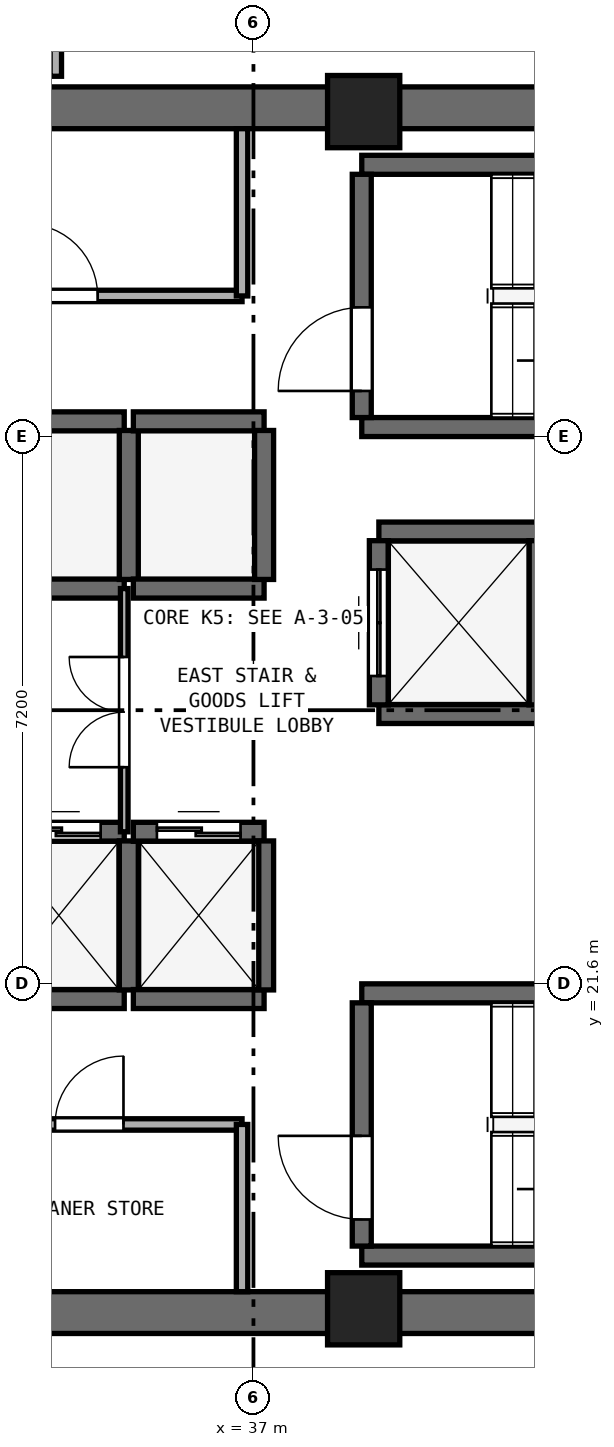
"""IFC4 building model, lengths in metres.
Left out: names, types, materials, properties, quantities, classifications, styles, units other than length and angle.
Written with IfcOpenShell. Run it as: python <this file> out.ifc"""

import sys

from ifc_helpers import new_model, si_unit, direction, frame, frame_2d, origin, origin_2d, place, context, subcontext, project, spatial, rectangle, extrude, element, fill, save


model = new_model("IFC4")
c1 = context("Model", 3, precision=1e-05, world=origin(), true_north=direction((0.0, 1.0)))
c2 = subcontext(c1, "Body", "Model", "MODEL_VIEW")
j1 = project(units=[si_unit("LENGTHUNIT", "METRE"), si_unit("PLANEANGLEUNIT", "RADIAN")], contexts=[c1])
p1 = place(None, origin())
s1 = spatial("IfcSite", under=j1, at=p1, CompositionType="ELEMENT")
p2 = place(p1, origin())
s2 = spatial("IfcBuilding", under=s1, at=p2, CompositionType="ELEMENT")
p3 = place(p2, frame((0.0, 0.0, 144.0)))
s3 = spatial("IfcBuildingStorey", under=s2, at=p3, CompositionType="ELEMENT", Elevation=144.0)
for number, where, z_axis, x_axis in (
    (1, (25.4, 17.275, 0.0), (0.0, 0.0, 1.0), (1.0, 0.0, 0.0)),
    (2, (25.4, 33.125, 0.0), (0.0, 0.0, 1.0), (1.0, 0.0, 0.0)),
):
    element("IfcWall", number, at=place(p3, frame(where, z_axis=z_axis, x_axis=x_axis)), inside=s3, PredefinedType="SHEAR", context=c2, shape_type="SweptSolid", body=[
        extrude(rectangle(XDim=23.2, YDim=0.55, at=frame_2d((11.6, 0.0))), origin(), (0.0, 0.0, 1.0), 3.54),
    ])
for number, where, z_axis, x_axis in (
    (3, (38.45, 17.325, 0.0), (0.0, 0.0, 1.0), (1.0, 0.0, 0.0)),
    (4, (38.45, 33.075, 0.0), (0.0, 0.0, 1.0), (1.0, 0.0, 0.0)),
):
    element("IfcColumn", number, at=place(p3, frame(where, z_axis=z_axis, x_axis=x_axis)), inside=s3, PredefinedType="PILASTER", context=c2, shape_type="SweptSolid", body=[
        extrude(rectangle(XDim=0.95, YDim=0.95, at=origin_2d()), origin(), (0.0, 0.0, 1.0), 3.8),
    ])
for number, where, z_axis, x_axis in (
    (5, (38.425, 28.925, 0.0), (0.0, 0.0, 1.0), (1.0, 0.0, 0.0)),
    (6, (38.425, 32.375, 0.0), (0.0, 0.0, 1.0), (1.0, 0.0, 0.0)),
):
    element("IfcWall", number, at=place(p3, frame(where, z_axis=z_axis, x_axis=x_axis)), inside=s3, PredefinedType="SHEAR", context=c2, shape_type="SweptSolid", body=[
        extrude(rectangle(XDim=7.3, YDim=0.25, at=frame_2d((3.65, 0.0))), origin(), (0.0, 0.0, 1.0), 3.54),
    ])
p4 = place(p3, frame((38.425, 29.05, 0.0), z_axis=(0.0, 0.0, 1.0), x_axis=(0.0, 1.0, 0.0)))
e7 = element("IfcWall", 7, at=p4, inside=s3, PredefinedType="SHEAR", context=c2, shape_type="SweptSolid", body=[
    extrude(rectangle(XDim=3.2, YDim=0.25, at=frame_2d((1.6, 0.0))), origin(), (0.0, 0.0, 1.0), 3.54),
])
p5 = place(p4, frame((0.35, 0.0, 0.0)))
e8 = element("IfcOpeningElement", 8, at=p5, cuts=e7, PredefinedType="OPENING", context=c2, shape_type="SweptSolid", body=[
    extrude(rectangle(XDim=1.1, YDim=2.15, at=frame_2d((0.55, 1.075))), frame((0.0, 0.135, 0.0), z_axis=(0.0, -1.0, 0.0), x_axis=(1.0, 0.0, 0.0)), (0.0, 0.0, 1.0), 0.27),
])
for number, where, z_axis, x_axis in (
    (9, (38.425, 18.025, 0.0), (0.0, 0.0, 1.0), (1.0, 0.0, 0.0)),
    (10, (38.425, 21.475, 0.0), (0.0, 0.0, 1.0), (1.0, 0.0, 0.0)),
):
    element("IfcWall", number, at=place(p3, frame(where, z_axis=z_axis, x_axis=x_axis)), inside=s3, PredefinedType="SHEAR", context=c2, shape_type="SweptSolid", body=[
        extrude(rectangle(XDim=7.3, YDim=0.25, at=frame_2d((3.65, 0.0))), origin(), (0.0, 0.0, 1.0), 3.54),
    ])
p6 = place(p3, frame((38.425, 18.15, 0.0), z_axis=(0.0, 0.0, 1.0), x_axis=(0.0, 1.0, 0.0)))
e11 = element("IfcWall", 11, at=p6, inside=s3, PredefinedType="SHEAR", context=c2, shape_type="SweptSolid", body=[
    extrude(rectangle(XDim=3.2, YDim=0.25, at=frame_2d((1.6, 0.0))), origin(), (0.0, 0.0, 1.0), 3.54),
])
p7 = place(p6, frame((0.35, 0.0, 0.0)))
e12 = element("IfcOpeningElement", 12, at=p7, cuts=e11, PredefinedType="OPENING", context=c2, shape_type="SweptSolid", body=[
    extrude(rectangle(XDim=1.1, YDim=2.15, at=frame_2d((0.55, 1.075))), frame((0.0, 0.135, 0.0), z_axis=(0.0, -1.0, 0.0), x_axis=(1.0, 0.0, 0.0)), (0.0, 0.0, 1.0), 0.27),
])
p8 = place(p3, frame((33.58, 21.4, 0.0), z_axis=(0.0, 0.0, 1.0), x_axis=(1.0, 0.0, 0.0)))
e13 = element("IfcWall", 13, at=p8, inside=s3, PredefinedType="SHEAR", context=c2, shape_type="SweptSolid", body=[
    extrude(rectangle(XDim=1.72, YDim=0.25, at=frame_2d((0.86, 0.0))), origin(), (0.0, 0.0, 1.0), 3.54),
])
p9 = place(p3, frame((33.58, 23.6, 0.0), z_axis=(0.0, 0.0, 1.0), x_axis=(1.0, 0.0, 0.0)))
e14 = element("IfcWall", 14, at=p9, inside=s3, PredefinedType="SHEAR", context=c2, shape_type="SweptSolid", body=[
    extrude(rectangle(XDim=1.72, YDim=0.25, at=frame_2d((0.86, 0.0))), origin(), (0.0, 0.0, 1.0), 3.54),
])
p10 = place(p9, frame((0.31, 0.0, 0.0)))
e15 = element("IfcOpeningElement", 15, at=p10, cuts=e14, PredefinedType="OPENING", context=c2, shape_type="SweptSolid", body=[
    extrude(rectangle(XDim=1.1, YDim=2.15, at=frame_2d((0.55, 1.075))), frame((0.0, 0.135, 0.0), z_axis=(0.0, -1.0, 0.0), x_axis=(1.0, 0.0, 0.0)), (0.0, 0.0, 1.0), 0.27),
])
p11 = place(p3, frame((35.36, 21.52, 0.0), z_axis=(0.0, 0.0, 1.0), x_axis=(0.0, 1.0, 0.0)))
e16 = element("IfcWall", 16, at=p11, inside=s3, PredefinedType="SHEAR", context=c2, shape_type="SweptSolid", body=[
    extrude(rectangle(XDim=1.96, YDim=0.25, at=frame_2d((0.98, 0.0))), origin(), (0.0, 0.0, 1.0), 3.54),
])
p12 = place(p3, frame((35.42, 21.4, 0.0), z_axis=(0.0, 0.0, 1.0), x_axis=(1.0, 0.0, 0.0)))
e17 = element("IfcWall", 17, at=p12, inside=s3, PredefinedType="SHEAR", context=c2, shape_type="SweptSolid", body=[
    extrude(rectangle(XDim=1.72, YDim=0.25, at=frame_2d((0.86, 0.0))), origin(), (0.0, 0.0, 1.0), 3.54),
])
p13 = place(p3, frame((35.42, 23.6, 0.0), z_axis=(0.0, 0.0, 1.0), x_axis=(1.0, 0.0, 0.0)))
e18 = element("IfcWall", 18, at=p13, inside=s3, PredefinedType="SHEAR", context=c2, shape_type="SweptSolid", body=[
    extrude(rectangle(XDim=1.72, YDim=0.25, at=frame_2d((0.86, 0.0))), origin(), (0.0, 0.0, 1.0), 3.54),
])
p14 = place(p13, frame((0.31, 0.0, 0.0)))
e19 = element("IfcOpeningElement", 19, at=p14, cuts=e18, PredefinedType="OPENING", context=c2, shape_type="SweptSolid", body=[
    extrude(rectangle(XDim=1.1, YDim=2.15, at=frame_2d((0.55, 1.075))), frame((0.0, 0.135, 0.0), z_axis=(0.0, -1.0, 0.0), x_axis=(1.0, 0.0, 0.0)), (0.0, 0.0, 1.0), 0.27),
])
p15 = place(p3, frame((37.14, 21.52, 0.0), z_axis=(0.0, 0.0, 1.0), x_axis=(0.0, 1.0, 0.0)))
e20 = element("IfcWall", 20, at=p15, inside=s3, PredefinedType="SHEAR", context=c2, shape_type="SweptSolid", body=[
    extrude(rectangle(XDim=1.96, YDim=0.25, at=frame_2d((0.98, 0.0))), origin(), (0.0, 0.0, 1.0), 3.54),
])
for number, where, z_axis, x_axis in (
    (21, (33.58, 26.8, 0.0), (0.0, 0.0, 1.0), (1.0, 0.0, 0.0)),
    (22, (33.58, 29.0, 0.0), (0.0, 0.0, 1.0), (1.0, 0.0, 0.0)),
):
    element("IfcWall", number, at=place(p3, frame(where, z_axis=z_axis, x_axis=x_axis)), inside=s3, PredefinedType="SHEAR", context=c2, shape_type="SweptSolid", body=[
        extrude(rectangle(XDim=1.72, YDim=0.25, at=frame_2d((0.86, 0.0))), origin(), (0.0, 0.0, 1.0), 3.54),
    ])
p16 = place(p3, frame((35.36, 26.92, 0.0), z_axis=(0.0, 0.0, 1.0), x_axis=(0.0, 1.0, 0.0)))
e23 = element("IfcWall", 23, at=p16, inside=s3, PredefinedType="SHEAR", context=c2, shape_type="SweptSolid", body=[
    extrude(rectangle(XDim=1.96, YDim=0.25, at=frame_2d((0.98, 0.0))), origin(), (0.0, 0.0, 1.0), 3.54),
])
for number, where, z_axis, x_axis in (
    (24, (35.42, 26.8, 0.0), (0.0, 0.0, 1.0), (1.0, 0.0, 0.0)),
    (25, (35.42, 29.0, 0.0), (0.0, 0.0, 1.0), (1.0, 0.0, 0.0)),
):
    element("IfcWall", number, at=place(p3, frame(where, z_axis=z_axis, x_axis=x_axis)), inside=s3, PredefinedType="SHEAR", context=c2, shape_type="SweptSolid", body=[
        extrude(rectangle(XDim=1.72, YDim=0.25, at=frame_2d((0.86, 0.0))), origin(), (0.0, 0.0, 1.0), 3.54),
    ])
p17 = place(p3, frame((37.14, 26.92, 0.0), z_axis=(0.0, 0.0, 1.0), x_axis=(0.0, 1.0, 0.0)))
e26 = element("IfcWall", 26, at=p17, inside=s3, PredefinedType="SHEAR", context=c2, shape_type="SweptSolid", body=[
    extrude(rectangle(XDim=1.96, YDim=0.25, at=frame_2d((0.98, 0.0))), origin(), (0.0, 0.0, 1.0), 3.54),
])
for number, where, z_axis, x_axis in (
    (27, (38.65, 25.15, 0.0), (0.0, 0.0, 1.0), (1.0, 0.0, 0.0)),
    (28, (38.65, 27.55, 0.0), (0.0, 0.0, 1.0), (1.0, 0.0, 0.0)),
):
    element("IfcWall", number, at=place(p3, frame(where, z_axis=z_axis, x_axis=x_axis)), inside=s3, PredefinedType="SHEAR", context=c2, shape_type="SweptSolid", body=[
        extrude(rectangle(XDim=2.1, YDim=0.25, at=frame_2d((1.05, 0.0))), origin(), (0.0, 0.0, 1.0), 3.54),
    ])
p18 = place(p3, frame((38.65, 25.27, 0.0), z_axis=(0.0, 0.0, 1.0), x_axis=(0.0, 1.0, 0.0)))
e29 = element("IfcWall", 29, at=p18, inside=s3, PredefinedType="SHEAR", context=c2, shape_type="SweptSolid", body=[
    extrude(rectangle(XDim=2.16, YDim=0.25, at=frame_2d((1.08, 0.0))), origin(), (0.0, 0.0, 1.0), 3.54),
])
p19 = place(p18, frame((0.38, 0.0, 0.0)))
e30 = element("IfcOpeningElement", 30, at=p19, cuts=e29, PredefinedType="OPENING", context=c2, shape_type="SweptSolid", body=[
    extrude(rectangle(XDim=1.4, YDim=2.2, at=frame_2d((0.7, 1.1))), frame((0.0, 0.135, 0.0), z_axis=(0.0, -1.0, 0.0), x_axis=(1.0, 0.0, 0.0)), (0.0, 0.0, 1.0), 0.27),
])
p20 = place(p3, frame((40.75, 25.27, 0.0), z_axis=(0.0, 0.0, 1.0), x_axis=(0.0, 1.0, 0.0)))
e31 = element("IfcWall", 31, at=p20, inside=s3, PredefinedType="SHEAR", context=c2, shape_type="SweptSolid", body=[
    extrude(rectangle(XDim=2.16, YDim=0.25, at=frame_2d((1.08, 0.0))), origin(), (0.0, 0.0, 1.0), 3.54),
])
p21 = place(p3, frame((32.1, 30.65, 0.0), z_axis=(0.0, 0.0, 1.0), x_axis=(1.0, 0.0, 0.0)))
e32 = element("IfcWall", 32, at=p21, inside=s3, PredefinedType="PARTITIONING", context=c2, shape_type="SweptSolid", body=[
    extrude(rectangle(XDim=4.75, YDim=0.15, at=frame_2d((2.375, 0.0))), origin(), (0.0, 0.0, 1.0), 3.54),
])
p22 = place(p21, frame((1.9, 0.0, 0.0)))
e33 = element("IfcOpeningElement", 33, at=p22, cuts=e32, PredefinedType="OPENING", context=c2, shape_type="SweptSolid", body=[
    extrude(rectangle(XDim=0.95, YDim=2.1, at=frame_2d((0.475, 1.05))), frame((0.0, 0.085, 0.0), z_axis=(0.0, -1.0, 0.0), x_axis=(1.0, 0.0, 0.0)), (0.0, 0.0, 1.0), 0.17),
])
p23 = place(p3, frame((36.85, 30.65, 0.0), z_axis=(0.0, 0.0, 1.0), x_axis=(0.0, 1.0, 0.0)))
e34 = element("IfcWall", 34, at=p23, inside=s3, PredefinedType="PARTITIONING", context=c2, shape_type="SweptSolid", body=[
    extrude(rectangle(XDim=2.2, YDim=0.15, at=frame_2d((1.1, 0.0))), origin(), (0.0, 0.0, 1.0), 3.54),
])
p24 = place(p3, frame((32.83, 19.75, 0.0), z_axis=(0.0, 0.0, 1.0), x_axis=(1.0, 0.0, 0.0)))
e35 = element("IfcWall", 35, at=p24, inside=s3, PredefinedType="PARTITIONING", context=c2, shape_type="SweptSolid", body=[
    extrude(rectangle(XDim=4.02, YDim=0.15, at=frame_2d((2.01, 0.0))), origin(), (0.0, 0.0, 1.0), 3.54),
])
p25 = place(p24, frame((1.56, 0.0, 0.0)))
e36 = element("IfcOpeningElement", 36, at=p25, cuts=e35, PredefinedType="OPENING", context=c2, shape_type="SweptSolid", body=[
    extrude(rectangle(XDim=0.9, YDim=2.1, at=frame_2d((0.45, 1.05))), frame((0.0, 0.085, 0.0), z_axis=(0.0, -1.0, 0.0), x_axis=(1.0, 0.0, 0.0)), (0.0, 0.0, 1.0), 0.17),
])
p26 = place(p3, frame((36.85, 17.55, 0.0), z_axis=(0.0, 0.0, 1.0), x_axis=(0.0, 1.0, 0.0)))
e37 = element("IfcWall", 37, at=p26, inside=s3, PredefinedType="PARTITIONING", context=c2, shape_type="SweptSolid", body=[
    extrude(rectangle(XDim=2.2, YDim=0.15, at=frame_2d((1.1, 0.0))), origin(), (0.0, 0.0, 1.0), 3.54),
])
p27 = place(p3, frame((35.3, 23.6, 0.0), z_axis=(0.0, 0.0, 1.0), x_axis=(0.0, 1.0, 0.0)))
e38 = element("IfcWall", 38, at=p27, inside=s3, PredefinedType="PARTITIONING", context=c2, shape_type="SweptSolid", body=[
    extrude(rectangle(XDim=3.2, YDim=0.1, at=frame_2d((1.6, 0.0))), origin(), (0.0, 0.0, 1.0), 3.54),
])
p28 = place(p27, frame((0.85, 0.0, 0.0)))
e39 = element("IfcOpeningElement", 39, at=p28, cuts=e38, PredefinedType="OPENING", context=c2, shape_type="SweptSolid", body=[
    extrude(rectangle(XDim=1.45, YDim=2.12, at=frame_2d((0.725, 1.06))), frame((0.0, 0.06, 0.0), z_axis=(0.0, -1.0, 0.0), x_axis=(1.0, 0.0, 0.0)), (0.0, 0.0, 1.0), 0.12),
])
p29 = place(p3, frame((34.4, 33.54, 0.0), z_axis=(0.0, 0.0, 1.0), x_axis=(0.0, 1.0, 0.0)))
e40 = element("IfcWall", 40, at=p29, inside=s3, PredefinedType="PARTITIONING", context=c2, shape_type="SweptSolid", body=[
    extrude(rectangle(XDim=2.76, YDim=0.15, at=frame_2d((1.38, 0.0))), origin(), (0.0, 0.0, 1.0), 3.54),
])
p30 = place(p5, origin())
e41 = element("IfcDoor", 41, at=p30, inside=s3, OperationType="SINGLE_SWING_LEFT", PredefinedType="DOOR", context=c2, shape_type="SweptSolid", body=[
    extrude(rectangle(XDim=1.1, YDim=2.15, at=frame_2d((0.55, 1.075))), frame((0.0, 0.025, 0.0), z_axis=(0.0, -1.0, 0.0), x_axis=(1.0, 0.0, 0.0)), (0.0, 0.0, 1.0), 0.05),
])
fill(e8, e41)
p31 = place(p7, origin())
e42 = element("IfcDoor", 42, at=p31, inside=s3, OperationType="SINGLE_SWING_RIGHT", PredefinedType="DOOR", context=c2, shape_type="SweptSolid", body=[
    extrude(rectangle(XDim=1.1, YDim=2.15, at=frame_2d((0.55, 1.075))), frame((0.0, 0.025, 0.0), z_axis=(0.0, -1.0, 0.0), x_axis=(1.0, 0.0, 0.0)), (0.0, 0.0, 1.0), 0.05),
])
fill(e12, e42)
p32 = place(p10, origin())
e43 = element("IfcDoor", 43, at=p32, inside=s3, OperationType="DOUBLE_DOOR_SLIDING", PredefinedType="DOOR", context=c2, shape_type="SweptSolid", body=[
    extrude(rectangle(XDim=1.1, YDim=2.15, at=frame_2d((0.55, 1.075))), frame((0.0, 0.025, 0.0), z_axis=(0.0, -1.0, 0.0), x_axis=(1.0, 0.0, 0.0)), (0.0, 0.0, 1.0), 0.05),
])
fill(e15, e43)
p33 = place(p14, origin())
e44 = element("IfcDoor", 44, at=p33, inside=s3, OperationType="DOUBLE_DOOR_SLIDING", PredefinedType="DOOR", context=c2, shape_type="SweptSolid", body=[
    extrude(rectangle(XDim=1.1, YDim=2.15, at=frame_2d((0.55, 1.075))), frame((0.0, 0.025, 0.0), z_axis=(0.0, -1.0, 0.0), x_axis=(1.0, 0.0, 0.0)), (0.0, 0.0, 1.0), 0.05),
])
fill(e19, e44)
p34 = place(p19, origin())
e45 = element("IfcDoor", 45, at=p34, inside=s3, OperationType="DOUBLE_DOOR_SLIDING", PredefinedType="DOOR", context=c2, shape_type="SweptSolid", body=[
    extrude(rectangle(XDim=1.4, YDim=2.2, at=frame_2d((0.7, 1.1))), frame((0.0, 0.025, 0.0), z_axis=(0.0, -1.0, 0.0), x_axis=(1.0, 0.0, 0.0)), (0.0, 0.0, 1.0), 0.05),
])
fill(e30, e45)
p35 = place(p22, origin())
e46 = element("IfcDoor", 46, at=p35, inside=s3, OperationType="SINGLE_SWING_LEFT", PredefinedType="DOOR", context=c2, shape_type="SweptSolid", body=[
    extrude(rectangle(XDim=0.95, YDim=2.1, at=frame_2d((0.475, 1.05))), frame((0.0, 0.025, 0.0), z_axis=(0.0, -1.0, 0.0), x_axis=(1.0, 0.0, 0.0)), (0.0, 0.0, 1.0), 0.05),
])
fill(e33, e46)
p36 = place(p25, origin())
e47 = element("IfcDoor", 47, at=p36, inside=s3, OperationType="SINGLE_SWING_RIGHT", PredefinedType="DOOR", context=c2, shape_type="SweptSolid", body=[
    extrude(rectangle(XDim=0.9, YDim=2.1, at=frame_2d((0.45, 1.05))), frame((0.0, 0.025, 0.0), z_axis=(0.0, -1.0, 0.0), x_axis=(1.0, 0.0, 0.0)), (0.0, 0.0, 1.0), 0.05),
])
fill(e36, e47)
p37 = place(p28, origin())
e48 = element("IfcDoor", 48, at=p37, inside=s3, OperationType="DOUBLE_DOOR_SINGLE_SWING", PredefinedType="DOOR", context=c2, shape_type="SweptSolid", body=[
    extrude(rectangle(XDim=1.45, YDim=2.12, at=frame_2d((0.725, 1.06))), frame((0.0, 0.025, 0.0), z_axis=(0.0, -1.0, 0.0), x_axis=(1.0, 0.0, 0.0)), (0.0, 0.0, 1.0), 0.05),
])
fill(e39, e48)
save(model, sys.argv[1])
